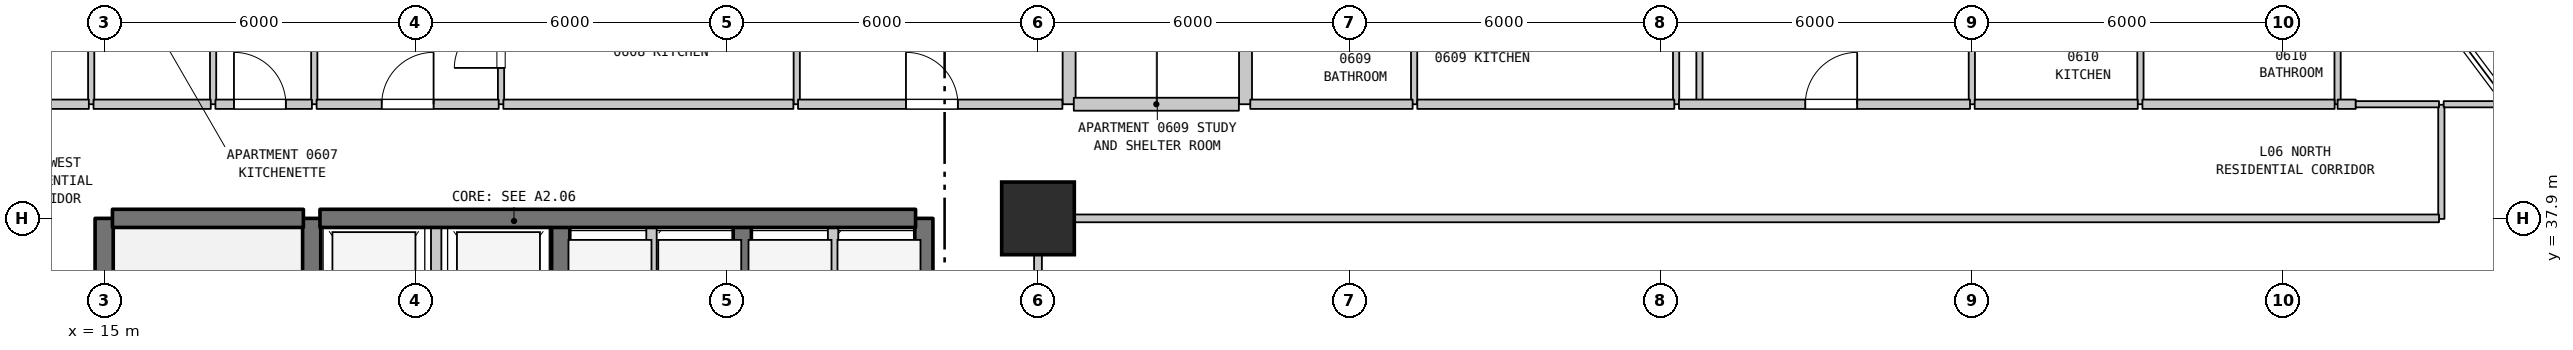
"""IFC4 building model, lengths in metres.
Left out: names, types, materials, properties, quantities, classifications, styles, units other than length and angle.
Written with IfcOpenShell. Run it as: python <this file> out.ifc"""

import sys

from ifc_helpers import new_model, si_unit, direction, frame, frame_2d, origin, origin_2d, place, context, subcontext, project, spatial, rectangle, extrude, element, fill, save


model = new_model("IFC4")
c1 = context("Model", 3, precision=1e-05, world=origin(), true_north=direction((0.0, 1.0)))
c2 = subcontext(c1, "Body", "Model", "MODEL_VIEW")
j1 = project(units=[si_unit("LENGTHUNIT", "METRE"), si_unit("PLANEANGLEUNIT", "RADIAN")], contexts=[c1])
p1 = place(None, origin())
s1 = spatial("IfcSite", under=j1, at=p1, CompositionType="ELEMENT")
p2 = place(p1, origin())
s2 = spatial("IfcBuilding", under=s1, at=p2, CompositionType="ELEMENT")
p3 = place(p2, frame((0.0, 0.0, 31.4)))
s3 = spatial("IfcBuildingStorey", under=s2, at=p3, CompositionType="ELEMENT", Elevation=31.4)
p4 = place(p3, frame((33.0, 37.9, 0.0), z_axis=(0.0, 0.0, 1.0), x_axis=(1.0, 0.0, 0.0)))
e1 = element("IfcColumn", 1, at=p4, inside=s3, PredefinedType="COLUMN", context=c2, shape_type="SweptSolid", body=[
    extrude(rectangle(XDim=1.4, YDim=1.4, at=origin_2d()), origin(), (0.0, 0.0, 1.0), 3.7),
])
p5 = place(p3, frame((14.75, 40.1, 0.0), z_axis=(0.0, 0.0, 1.0), x_axis=(0.0, 1.0, 0.0)))
e2 = element("IfcWall", 2, at=p5, inside=s3, PredefinedType="PARTITIONING", context=c2, shape_type="SweptSolid", body=[
    extrude(rectangle(XDim=3.2, YDim=0.12, at=frame_2d((1.6, 0.0))), origin(), (0.0, 0.0, 1.0), 3.385),
])
p6 = place(p5, frame((1.15, 0.0, 0.0)))
e3 = element("IfcOpeningElement", 3, at=p6, cuts=e2, PredefinedType="OPENING", context=c2, shape_type="SweptSolid", body=[
    extrude(rectangle(XDim=0.9, YDim=2.15, at=frame_2d((0.45, 1.075))), frame((0.0, 0.07, 0.0), z_axis=(0.0, -1.0, 0.0), x_axis=(1.0, 0.0, 0.0)), (0.0, 0.0, 1.0), 0.14),
])
p7 = place(p3, frame((15.0, 31.1, 0.0), z_axis=(0.0, 0.0, 1.0), x_axis=(0.0, 1.0, 0.0)))
e4 = element("IfcWall", 4, at=p7, inside=s3, PredefinedType="SHEAR", context=c2, shape_type="SweptSolid", body=[
    extrude(rectangle(XDim=6.8, YDim=0.35, at=frame_2d((3.4, 0.0))), origin(), (0.0, 0.0, 1.0), 3.385),
])
p8 = place(p3, frame((17.1, 40.1, 0.0), z_axis=(0.0, 0.0, 1.0), x_axis=(0.0, 1.0, 0.0)))
e5 = element("IfcWall", 5, at=p8, inside=s3, PredefinedType="PARTITIONING", context=c2, shape_type="SweptSolid", body=[
    extrude(rectangle(XDim=3.2, YDim=0.12, at=frame_2d((1.6, 0.0))), origin(), (0.0, 0.0, 1.0), 3.385),
])
p9 = place(p3, frame((19.0, 35.0, 0.0), z_axis=(0.0, 0.0, 1.0), x_axis=(0.0, 1.0, 0.0)))
e6 = element("IfcWall", 6, at=p9, inside=s3, PredefinedType="SHEAR", context=c2, shape_type="SweptSolid", body=[
    extrude(rectangle(XDim=2.9, YDim=0.35, at=frame_2d((1.45, 0.0))), origin(), (0.0, 0.0, 1.0), 3.385),
])
p10 = place(p3, frame((19.05, 40.1, 0.0), z_axis=(0.0, 0.0, 1.0), x_axis=(0.0, 1.0, 0.0)))
e7 = element("IfcWall", 7, at=p10, inside=s3, PredefinedType="PARTITIONING", context=c2, shape_type="SweptSolid", body=[
    extrude(rectangle(XDim=13.79, YDim=0.12, at=frame_2d((6.895, 0.0))), origin(), (0.0, 0.0, 1.0), 3.385),
])
p11 = place(p3, frame((21.4, 35.0, 0.0), z_axis=(0.0, 0.0, 1.0), x_axis=(0.0, 1.0, 0.0)))
e8 = element("IfcWall", 8, at=p11, inside=s3, PredefinedType="STANDARD", context=c2, shape_type="SweptSolid", body=[
    extrude(rectangle(XDim=2.9, YDim=0.2, at=frame_2d((1.45, 0.0))), origin(), (0.0, 0.0, 1.0), 3.385),
])
p12 = place(p3, frame((22.65, 40.1, 0.0), z_axis=(0.0, 0.0, 1.0), x_axis=(0.0, 1.0, 0.0)))
e9 = element("IfcWall", 9, at=p12, inside=s3, PredefinedType="PARTITIONING", context=c2, shape_type="SweptSolid", body=[
    extrude(rectangle(XDim=2.3, YDim=0.12, at=frame_2d((1.15, 0.0))), origin(), (0.0, 0.0, 1.0), 3.385),
])
p13 = place(p12, frame((0.7, 0.0, 0.0)))
e10 = element("IfcOpeningElement", 10, at=p13, cuts=e9, PredefinedType="OPENING", context=c2, shape_type="SweptSolid", body=[
    extrude(rectangle(XDim=0.9, YDim=2.15, at=frame_2d((0.45, 1.075))), frame((0.0, 0.07, 0.0), z_axis=(0.0, -1.0, 0.0), x_axis=(1.0, 0.0, 0.0)), (0.0, 0.0, 1.0), 0.14),
])
p14 = place(p3, frame((23.8, 35.0, 0.0), z_axis=(0.0, 0.0, 1.0), x_axis=(0.0, 1.0, 0.0)))
e11 = element("IfcWall", 11, at=p14, inside=s3, PredefinedType="SHEAR", context=c2, shape_type="SweptSolid", body=[
    extrude(rectangle(XDim=2.9, YDim=0.35, at=frame_2d((1.45, 0.0))), origin(), (0.0, 0.0, 1.0), 3.385),
])
p15 = place(p3, frame((25.55, 35.0, 0.0), z_axis=(0.0, 0.0, 1.0), x_axis=(0.0, 1.0, 0.0)))
e12 = element("IfcWall", 12, at=p15, inside=s3, PredefinedType="STANDARD", context=c2, shape_type="SweptSolid", body=[
    extrude(rectangle(XDim=2.9, YDim=0.2, at=frame_2d((1.45, 0.0))), origin(), (0.0, 0.0, 1.0), 3.385),
])
p16 = place(p3, frame((27.3, 35.0, 0.0), z_axis=(0.0, 0.0, 1.0), x_axis=(0.0, 1.0, 0.0)))
e13 = element("IfcWall", 13, at=p16, inside=s3, PredefinedType="SHEAR", context=c2, shape_type="SweptSolid", body=[
    extrude(rectangle(XDim=2.9, YDim=0.35, at=frame_2d((1.45, 0.0))), origin(), (0.0, 0.0, 1.0), 3.385),
])
p17 = place(p3, frame((28.35, 40.1, 0.0), z_axis=(0.0, 0.0, 1.0), x_axis=(0.0, 1.0, 0.0)))
e14 = element("IfcWall", 14, at=p17, inside=s3, PredefinedType="PARTITIONING", context=c2, shape_type="SweptSolid", body=[
    extrude(rectangle(XDim=2.05, YDim=0.12, at=frame_2d((1.025, 0.0))), origin(), (0.0, 0.0, 1.0), 3.385),
])
p18 = place(p3, frame((29.05, 35.0, 0.0), z_axis=(0.0, 0.0, 1.0), x_axis=(0.0, 1.0, 0.0)))
e15 = element("IfcWall", 15, at=p18, inside=s3, PredefinedType="STANDARD", context=c2, shape_type="SweptSolid", body=[
    extrude(rectangle(XDim=2.9, YDim=0.2, at=frame_2d((1.45, 0.0))), origin(), (0.0, 0.0, 1.0), 3.385),
])
p19 = place(p3, frame((30.8, 35.0, 0.0), z_axis=(0.0, 0.0, 1.0), x_axis=(0.0, 1.0, 0.0)))
e16 = element("IfcWall", 16, at=p19, inside=s3, PredefinedType="SHEAR", context=c2, shape_type="SweptSolid", body=[
    extrude(rectangle(XDim=2.9, YDim=0.35, at=frame_2d((1.45, 0.0))), origin(), (0.0, 0.0, 1.0), 3.385),
])
p20 = place(p3, frame((33.0, 27.91, 0.0), z_axis=(0.0, 0.0, 1.0), x_axis=(0.0, 1.0, 0.0)))
e17 = element("IfcWall", 17, at=p20, inside=s3, PredefinedType="STANDARD", context=c2, shape_type="SweptSolid", body=[
    extrude(rectangle(XDim=9.98, YDim=0.15, at=frame_2d((4.99, 0.0))), origin(), (0.0, 0.0, 1.0), 2.885),
])
for number, where, z_axis, x_axis in (
    (18, (33.6, 40.1, 0.0), (0.0, 0.0, 1.0), (0.0, 1.0, 0.0)),
    (19, (37.0, 40.1, 0.0), (0.0, 0.0, 1.0), (0.0, 1.0, 0.0)),
):
    element("IfcWall", number, at=place(p3, frame(where, z_axis=z_axis, x_axis=x_axis)), inside=s3, PredefinedType="STANDARD", context=c2, shape_type="SweptSolid", body=[
        extrude(rectangle(XDim=2.3, YDim=0.25, at=frame_2d((1.15, 0.0))), origin(), (0.0, 0.0, 1.0), 3.385),
    ])
for number, where, z_axis, x_axis in (
    (20, (40.25, 40.1, 0.0), (0.0, 0.0, 1.0), (0.0, 1.0, 0.0)),
    (21, (45.3, 40.1, 0.0), (0.0, 0.0, 1.0), (0.0, 1.0, 0.0)),
):
    element("IfcWall", number, at=place(p3, frame(where, z_axis=z_axis, x_axis=x_axis)), inside=s3, PredefinedType="PARTITIONING", context=c2, shape_type="SweptSolid", body=[
        extrude(rectangle(XDim=2.3, YDim=0.12, at=frame_2d((1.15, 0.0))), origin(), (0.0, 0.0, 1.0), 3.385),
    ])
p21 = place(p3, frame((45.75, 40.1, 0.0), z_axis=(0.0, 0.0, 1.0), x_axis=(0.0, 1.0, 0.0)))
e22 = element("IfcWall", 22, at=p21, inside=s3, PredefinedType="PARTITIONING", context=c2, shape_type="SweptSolid", body=[
    extrude(rectangle(XDim=2.05, YDim=0.12, at=frame_2d((1.025, 0.0))), origin(), (0.0, 0.0, 1.0), 3.385),
])
for number, where, z_axis, x_axis in (
    (23, (51.0, 40.1, 0.0), (0.0, 0.0, 1.0), (0.0, 1.0, 0.0)),
    (24, (54.25, 40.1, 0.0), (0.0, 0.0, 1.0), (0.0, 1.0, 0.0)),
    (25, (58.05, 40.1, 0.0), (0.0, 0.0, 1.0), (0.0, 1.0, 0.0)),
):
    element("IfcWall", number, at=place(p3, frame(where, z_axis=z_axis, x_axis=x_axis)), inside=s3, PredefinedType="PARTITIONING", context=c2, shape_type="SweptSolid", body=[
        extrude(rectangle(XDim=2.3, YDim=0.12, at=frame_2d((1.15, 0.0))), origin(), (0.0, 0.0, 1.0), 3.385),
    ])
p22 = place(p3, frame((60.05, 37.89, 0.0), z_axis=(0.0, 0.0, 1.0), x_axis=(0.0, 1.0, 0.0)))
e26 = element("IfcWall", 26, at=p22, inside=s3, PredefinedType="PARTITIONING", context=c2, shape_type="SweptSolid", body=[
    extrude(rectangle(XDim=2.2, YDim=0.12, at=frame_2d((1.1, 0.0))), origin(), (0.0, 0.0, 1.0), 3.385),
])
p23 = place(p3, frame((15.16, 37.9, 0.0), z_axis=(0.0, 0.0, 1.0), x_axis=(1.0, 0.0, 0.0)))
e27 = element("IfcWall", 27, at=p23, inside=s3, PredefinedType="SHEAR", context=c2, shape_type="SweptSolid", body=[
    extrude(rectangle(XDim=3.68, YDim=0.35, at=frame_2d((1.84, 0.0))), origin(), (0.0, 0.0, 1.0), 3.385),
])
p24 = place(p3, frame((19.16, 37.9, 0.0), z_axis=(0.0, 0.0, 1.0), x_axis=(1.0, 0.0, 0.0)))
e28 = element("IfcWall", 28, at=p24, inside=s3, PredefinedType="SHEAR", context=c2, shape_type="SweptSolid", body=[
    extrude(rectangle(XDim=11.48, YDim=0.35, at=frame_2d((5.74, 0.0))), origin(), (0.0, 0.0, 1.0), 3.385),
])
p25 = place(p3, frame((33.07, 37.9, 0.0), z_axis=(0.0, 0.0, 1.0), x_axis=(1.0, 0.0, 0.0)))
e29 = element("IfcWall", 29, at=p25, inside=s3, PredefinedType="STANDARD", context=c2, shape_type="SweptSolid", body=[
    extrude(rectangle(XDim=26.935, YDim=0.15, at=frame_2d((13.467, 0.0))), origin(), (0.0, 0.0, 1.0), 3.385),
])
p26 = place(p3, frame((12.875, 40.1, 0.0), z_axis=(0.0, 0.0, 1.0), x_axis=(1.0, 0.0, 0.0)))
e30 = element("IfcWall", 30, at=p26, inside=s3, PredefinedType="STANDARD", context=c2, shape_type="SweptSolid", body=[
    extrude(rectangle(XDim=1.83, YDim=0.18, at=frame_2d((0.915, 0.0))), origin(), (0.0, 0.0, 1.0), 3.385),
])
p27 = place(p3, frame((14.795, 40.1, 0.0), z_axis=(0.0, 0.0, 1.0), x_axis=(1.0, 0.0, 0.0)))
e31 = element("IfcWall", 31, at=p27, inside=s3, PredefinedType="STANDARD", context=c2, shape_type="SweptSolid", body=[
    extrude(rectangle(XDim=2.26, YDim=0.18, at=frame_2d((1.13, 0.0))), origin(), (0.0, 0.0, 1.0), 3.385),
])
p28 = place(p3, frame((17.145, 40.1, 0.0), z_axis=(0.0, 0.0, 1.0), x_axis=(1.0, 0.0, 0.0)))
e32 = element("IfcWall", 32, at=p28, inside=s3, PredefinedType="STANDARD", context=c2, shape_type="SweptSolid", body=[
    extrude(rectangle(XDim=1.86, YDim=0.18, at=frame_2d((0.93, 0.0))), origin(), (0.0, 0.0, 1.0), 3.385),
])
p29 = place(p28, frame((0.357, 0.0, 0.0)))
e33 = element("IfcOpeningElement", 33, at=p29, cuts=e32, PredefinedType="OPENING", context=c2, shape_type="SweptSolid", body=[
    extrude(rectangle(XDim=1.0, YDim=2.15, at=frame_2d((0.5, 1.075))), frame((0.0, 0.1, 0.0), z_axis=(0.0, -1.0, 0.0), x_axis=(1.0, 0.0, 0.0)), (0.0, 0.0, 1.0), 0.2),
])
p30 = place(p3, frame((19.095, 40.1, 0.0), z_axis=(0.0, 0.0, 1.0), x_axis=(1.0, 0.0, 0.0)))
e34 = element("IfcWall", 34, at=p30, inside=s3, PredefinedType="STANDARD", context=c2, shape_type="SweptSolid", body=[
    extrude(rectangle(XDim=3.51, YDim=0.18, at=frame_2d((1.755, 0.0))), origin(), (0.0, 0.0, 1.0), 3.385),
])
p31 = place(p30, frame((1.255, 0.0, 0.0)))
e35 = element("IfcOpeningElement", 35, at=p31, cuts=e34, PredefinedType="OPENING", context=c2, shape_type="SweptSolid", body=[
    extrude(rectangle(XDim=1.0, YDim=2.15, at=frame_2d((0.5, 1.075))), frame((0.0, 0.1, 0.0), z_axis=(0.0, -1.0, 0.0), x_axis=(1.0, 0.0, 0.0)), (0.0, 0.0, 1.0), 0.2),
])
p32 = place(p3, frame((22.695, 40.1, 0.0), z_axis=(0.0, 0.0, 1.0), x_axis=(1.0, 0.0, 0.0)))
e36 = element("IfcWall", 36, at=p32, inside=s3, PredefinedType="STANDARD", context=c2, shape_type="SweptSolid", body=[
    extrude(rectangle(XDim=5.59, YDim=0.18, at=frame_2d((2.795, 0.0))), origin(), (0.0, 0.0, 1.0), 3.385),
])
p33 = place(p3, frame((28.375, 40.1, 0.0), z_axis=(0.0, 0.0, 1.0), x_axis=(1.0, 0.0, 0.0)))
e37 = element("IfcWall", 37, at=p33, inside=s3, PredefinedType="STANDARD", context=c2, shape_type="SweptSolid", body=[
    extrude(rectangle(XDim=5.095, YDim=0.18, at=frame_2d((2.547, 0.0))), origin(), (0.0, 0.0, 1.0), 3.385),
])
p34 = place(p33, frame((2.08, 0.0, 0.0)))
e38 = element("IfcOpeningElement", 38, at=p34, cuts=e37, PredefinedType="OPENING", context=c2, shape_type="SweptSolid", body=[
    extrude(rectangle(XDim=1.0, YDim=2.15, at=frame_2d((0.5, 1.075))), frame((0.0, 0.1, 0.0), z_axis=(0.0, -1.0, 0.0), x_axis=(1.0, 0.0, 0.0)), (0.0, 0.0, 1.0), 0.2),
])
p35 = place(p3, frame((33.69, 40.1, 0.0), z_axis=(0.0, 0.0, 1.0), x_axis=(1.0, 0.0, 0.0)))
e39 = element("IfcWall", 39, at=p35, inside=s3, PredefinedType="STANDARD", context=c2, shape_type="SweptSolid", body=[
    extrude(rectangle(XDim=3.182, YDim=0.25, at=frame_2d((1.591, 0.0))), origin(), (0.0, 0.0, 1.0), 3.385),
])
p36 = place(p3, frame((37.092, 40.1, 0.0), z_axis=(0.0, 0.0, 1.0), x_axis=(1.0, 0.0, 0.0)))
e40 = element("IfcWall", 40, at=p36, inside=s3, PredefinedType="STANDARD", context=c2, shape_type="SweptSolid", body=[
    extrude(rectangle(XDim=3.129, YDim=0.18, at=frame_2d((1.564, 0.0))), origin(), (0.0, 0.0, 1.0), 3.385),
])
p37 = place(p3, frame((40.311, 40.1, 0.0), z_axis=(0.0, 0.0, 1.0), x_axis=(1.0, 0.0, 0.0)))
e41 = element("IfcWall", 41, at=p37, inside=s3, PredefinedType="STANDARD", context=c2, shape_type="SweptSolid", body=[
    extrude(rectangle(XDim=4.954, YDim=0.18, at=frame_2d((2.477, 0.0))), origin(), (0.0, 0.0, 1.0), 3.385),
])
p38 = place(p3, frame((45.355, 40.1, 0.0), z_axis=(0.0, 0.0, 1.0), x_axis=(1.0, 0.0, 0.0)))
e42 = element("IfcWall", 42, at=p38, inside=s3, PredefinedType="STANDARD", context=c2, shape_type="SweptSolid", body=[
    extrude(rectangle(XDim=5.61, YDim=0.18, at=frame_2d((2.805, 0.0))), origin(), (0.0, 0.0, 1.0), 3.385),
])
p39 = place(p38, frame((2.435, 0.0, 0.0)))
e43 = element("IfcOpeningElement", 43, at=p39, cuts=e42, PredefinedType="OPENING", context=c2, shape_type="SweptSolid", body=[
    extrude(rectangle(XDim=1.0, YDim=2.15, at=frame_2d((0.5, 1.075))), frame((0.0, 0.1, 0.0), z_axis=(0.0, -1.0, 0.0), x_axis=(1.0, 0.0, 0.0)), (0.0, 0.0, 1.0), 0.2),
])
p40 = place(p3, frame((51.055, 40.1, 0.0), z_axis=(0.0, 0.0, 1.0), x_axis=(1.0, 0.0, 0.0)))
e44 = element("IfcWall", 44, at=p40, inside=s3, PredefinedType="STANDARD", context=c2, shape_type="SweptSolid", body=[
    extrude(rectangle(XDim=3.143, YDim=0.18, at=frame_2d((1.572, 0.0))), origin(), (0.0, 0.0, 1.0), 3.385),
])
p41 = place(p3, frame((54.288, 40.1, 0.0), z_axis=(0.0, 0.0, 1.0), x_axis=(1.0, 0.0, 0.0)))
e45 = element("IfcWall", 45, at=p41, inside=s3, PredefinedType="STANDARD", context=c2, shape_type="SweptSolid", body=[
    extrude(rectangle(XDim=3.705, YDim=0.18, at=frame_2d((1.853, 0.0))), origin(), (0.0, 0.0, 1.0), 3.385),
])
p42 = place(p3, frame((58.05, 40.1, 0.0), z_axis=(0.0, 0.0, 1.0), x_axis=(1.0, 0.0, 0.0)))
e46 = element("IfcWall", 46, at=p42, inside=s3, PredefinedType="STANDARD", context=c2, shape_type="SweptSolid", body=[
    extrude(rectangle(XDim=0.35, YDim=0.18, at=frame_2d((0.175, 0.0))), origin(), (0.0, 0.0, 1.0), 3.385),
])
p43 = place(p3, frame((58.4, 40.1, 0.0), z_axis=(0.0, 0.0, 1.0), x_axis=(1.0, 0.0, 0.0)))
e47 = element("IfcWall", 47, at=p43, inside=s3, PredefinedType="PARTITIONING", context=c2, shape_type="SweptSolid", body=[
    extrude(rectangle(XDim=1.605, YDim=0.12, at=frame_2d((0.802, 0.0))), origin(), (0.0, 0.0, 1.0), 3.385),
])
p44 = place(p3, frame((60.095, 40.1, 0.0), z_axis=(0.0, 0.0, 1.0), x_axis=(1.0, 0.0, 0.0)))
e48 = element("IfcWall", 48, at=p44, inside=s3, PredefinedType="PARTITIONING", context=c2, shape_type="SweptSolid", body=[
    extrude(rectangle(XDim=1.245, YDim=0.12, at=frame_2d((0.623, 0.0))), origin(), (0.0, 0.0, 1.0), 3.385),
])
p45 = place(p13, origin())
e49 = element("IfcDoor", 49, at=p45, inside=s3, OperationType="SINGLE_SWING_LEFT", PredefinedType="DOOR", context=c2, shape_type="SweptSolid", body=[
    extrude(rectangle(XDim=0.9, YDim=2.15, at=frame_2d((0.45, 1.075))), frame((0.0, 0.025, 0.0), z_axis=(0.0, -1.0, 0.0), x_axis=(1.0, 0.0, 0.0)), (0.0, 0.0, 1.0), 0.05),
])
fill(e10, e49)
p46 = place(p29, origin())
e50 = element("IfcDoor", 50, at=p46, inside=s3, OperationType="SINGLE_SWING_LEFT", PredefinedType="DOOR", context=c2, shape_type="SweptSolid", body=[
    extrude(rectangle(XDim=1.0, YDim=2.15, at=frame_2d((0.5, 1.075))), frame((0.0, 0.025, 0.0), z_axis=(0.0, -1.0, 0.0), x_axis=(1.0, 0.0, 0.0)), (0.0, 0.0, 1.0), 0.05),
])
fill(e33, e50)
p47 = place(p31, origin())
e51 = element("IfcDoor", 51, at=p47, inside=s3, OperationType="SINGLE_SWING_RIGHT", PredefinedType="DOOR", context=c2, shape_type="SweptSolid", body=[
    extrude(rectangle(XDim=1.0, YDim=2.15, at=frame_2d((0.5, 1.075))), frame((0.0, 0.025, 0.0), z_axis=(0.0, -1.0, 0.0), x_axis=(1.0, 0.0, 0.0)), (0.0, 0.0, 1.0), 0.05),
])
fill(e35, e51)
p48 = place(p34, origin())
e52 = element("IfcDoor", 52, at=p48, inside=s3, OperationType="SINGLE_SWING_LEFT", PredefinedType="DOOR", context=c2, shape_type="SweptSolid", body=[
    extrude(rectangle(XDim=1.0, YDim=2.15, at=frame_2d((0.5, 1.075))), frame((0.0, 0.025, 0.0), z_axis=(0.0, -1.0, 0.0), x_axis=(1.0, 0.0, 0.0)), (0.0, 0.0, 1.0), 0.05),
])
fill(e38, e52)
p49 = place(p39, origin())
e53 = element("IfcDoor", 53, at=p49, inside=s3, OperationType="SINGLE_SWING_RIGHT", PredefinedType="DOOR", context=c2, shape_type="SweptSolid", body=[
    extrude(rectangle(XDim=1.0, YDim=2.15, at=frame_2d((0.5, 1.075))), frame((0.0, 0.025, 0.0), z_axis=(0.0, -1.0, 0.0), x_axis=(1.0, 0.0, 0.0)), (0.0, 0.0, 1.0), 0.05),
])
fill(e43, e53)
save(model, sys.argv[1])
